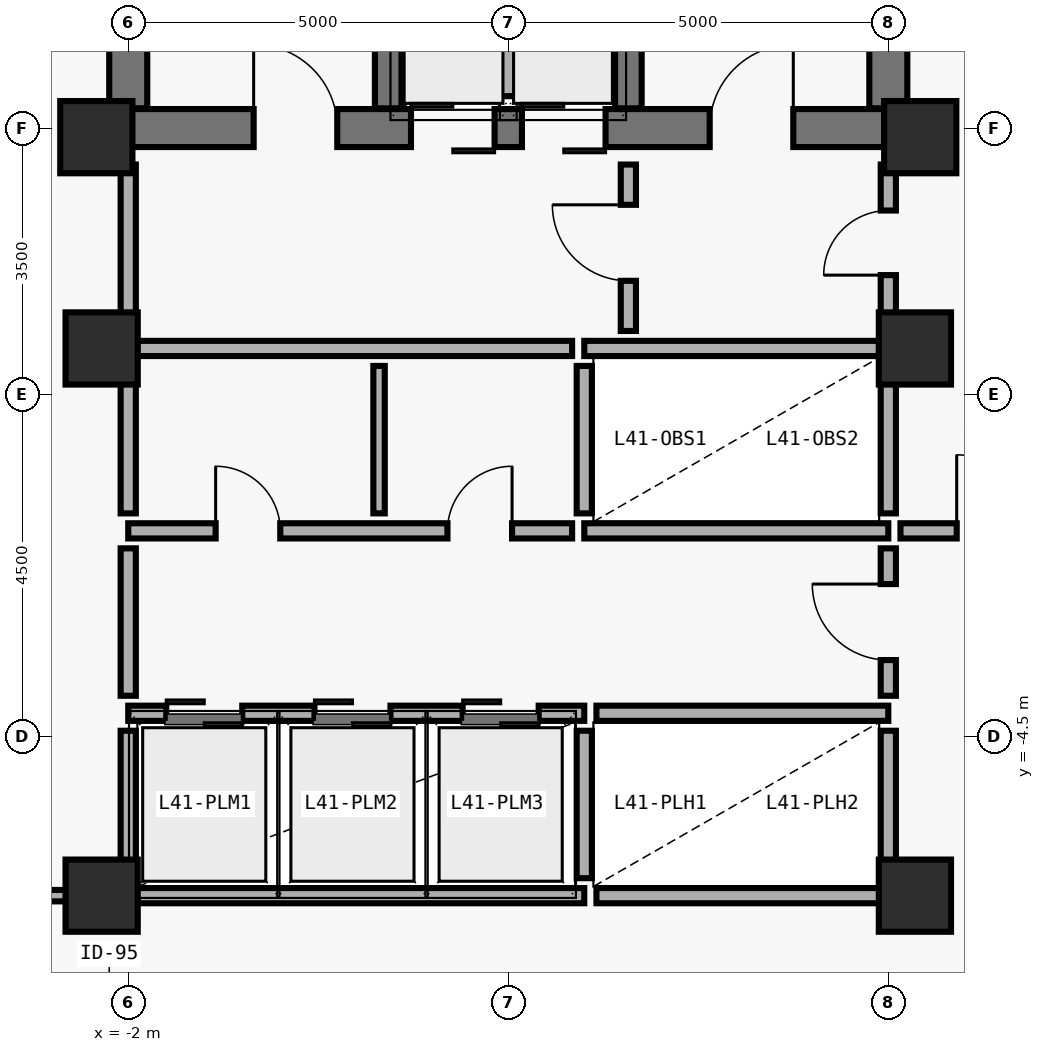
"""IFC4 building model, lengths in metres.
Left out: names, types, materials, properties, quantities, classifications, styles, units other than length and angle.
Written with IfcOpenShell. Run it as: python <this file> out.ifc"""

import sys

from ifc_helpers import new_model, si_unit, direction, frame, frame_2d, origin, origin_2d, place, context, subcontext, project, spatial, rectangle, extrude, element, fill, save


model = new_model("IFC4")
c1 = context("Model", 3, precision=1e-05, world=origin(), true_north=direction((0.0, 1.0)))
c2 = subcontext(c1, "Body", "Model", "MODEL_VIEW")
j1 = project(units=[si_unit("LENGTHUNIT", "METRE"), si_unit("PLANEANGLEUNIT", "RADIAN")], contexts=[c1])
p1 = place(None, origin())
s1 = spatial("IfcSite", under=j1, at=p1, CompositionType="ELEMENT")
p2 = place(p1, origin())
s2 = spatial("IfcBuilding", under=s1, at=p2, CompositionType="ELEMENT")
p3 = place(p2, frame((0.0, 0.0, 165.6)))
s3 = spatial("IfcBuildingStorey", under=s2, at=p3, CompositionType="ELEMENT", Elevation=165.6)
p4 = place(p3, frame((-2.0, 3.5, 0.0), z_axis=(0.0, 0.0, 1.0), x_axis=(1.0, 0.0, 0.0)))
e1 = element("IfcWall", 1, at=p4, inside=s3, PredefinedType="SHEAR", context=c2, shape_type="SweptSolid", body=[
    extrude(rectangle(XDim=10.0, YDim=0.5, at=frame_2d((5.0, 0.0))), origin(), (0.0, 0.0, 1.0), 3.892),
])
p5 = place(p4, frame((1.65, 0.0, 0.0)))
e2 = element("IfcOpeningElement", 2, at=p5, cuts=e1, PredefinedType="OPENING", context=c2, shape_type="SweptSolid", body=[
    extrude(rectangle(XDim=1.1, YDim=2.15, at=frame_2d((0.55, 1.075))), frame((0.0, 0.26, 0.0), z_axis=(0.0, -1.0, 0.0), x_axis=(1.0, 0.0, 0.0)), (0.0, 0.0, 1.0), 0.52),
])
p6 = place(p4, frame((7.65, 0.0, 0.0)))
e3 = element("IfcOpeningElement", 3, at=p6, cuts=e1, PredefinedType="OPENING", context=c2, shape_type="SweptSolid", body=[
    extrude(rectangle(XDim=1.1, YDim=2.15, at=frame_2d((0.55, 1.075))), frame((0.0, 0.26, 0.0), z_axis=(0.0, -1.0, 0.0), x_axis=(1.0, 0.0, 0.0)), (0.0, 0.0, 1.0), 0.52),
])
p7 = place(p4, frame((3.72, 0.0, 0.0)))
e4 = element("IfcOpeningElement", 4, at=p7, cuts=e1, PredefinedType="OPENING", context=c2, shape_type="SweptSolid", body=[
    extrude(rectangle(XDim=1.1, YDim=2.2, at=frame_2d((0.55, 1.1))), frame((0.0, 0.26, 0.0), z_axis=(0.0, -1.0, 0.0), x_axis=(1.0, 0.0, 0.0)), (0.0, 0.0, 1.0), 0.52),
])
p8 = place(p4, frame((5.18, 0.0, 0.0)))
e5 = element("IfcOpeningElement", 5, at=p8, cuts=e1, PredefinedType="OPENING", context=c2, shape_type="SweptSolid", body=[
    extrude(rectangle(XDim=1.1, YDim=2.2, at=frame_2d((0.55, 1.1))), frame((0.0, 0.26, 0.0), z_axis=(0.0, -1.0, 0.0), x_axis=(1.0, 0.0, 0.0)), (0.0, 0.0, 1.0), 0.52),
])
for number, where, z_axis, x_axis in (
    (6, (-2.0, 3.76, 0.0), (0.0, 0.0, 1.0), (0.0, 1.0, 0.0)),
    (7, (8.0, 3.76, 0.0), (0.0, 0.0, 1.0), (0.0, 1.0, 0.0)),
):
    element("IfcWall", number, at=place(p3, frame(where, z_axis=z_axis, x_axis=x_axis)), inside=s3, PredefinedType="SHEAR", context=c2, shape_type="SweptSolid", body=[
        extrude(rectangle(XDim=8.48, YDim=0.5, at=frame_2d((4.24, 0.0))), origin(), (0.0, 0.0, 1.0), 3.892),
    ])
for number, where, z_axis, x_axis in (
    (8, (1.42, 3.76, 0.0), (0.0, 0.0, 1.0), (0.0, 1.0, 0.0)),
    (9, (4.58, 3.76, 0.0), (0.0, 0.0, 1.0), (0.0, 1.0, 0.0)),
):
    element("IfcWall", number, at=place(p3, frame(where, z_axis=z_axis, x_axis=x_axis)), inside=s3, PredefinedType="SHEAR", context=c2, shape_type="SweptSolid", body=[
        extrude(rectangle(XDim=8.48, YDim=0.35, at=frame_2d((4.24, 0.0))), origin(), (0.0, 0.0, 1.0), 3.892),
    ])
for number, where, z_axis, x_axis in (
    (10, (-2.42, 3.38, 0.0), (0.0, 0.0, 1.0), (1.0, 0.0, 0.0)),
    (11, (8.42, 3.38, 0.0), (0.0, 0.0, 1.0), (1.0, 0.0, 0.0)),
    (12, (-2.35, 0.6, 0.0), (0.0, 0.0, 1.0), (1.0, 0.0, 0.0)),
    (13, (8.35, 0.6, 0.0), (0.0, 0.0, 1.0), (1.0, 0.0, 0.0)),
    (14, (-2.35, -6.6, 0.0), (0.0, 0.0, 1.0), (1.0, 0.0, 0.0)),
    (15, (8.35, -6.6, 0.0), (0.0, 0.0, 1.0), (1.0, 0.0, 0.0)),
):
    element("IfcColumn", number, at=place(p3, frame(where, z_axis=z_axis, x_axis=x_axis)), inside=s3, PredefinedType="COLUMN", context=c2, shape_type="SweptSolid", body=[
        extrude(rectangle(XDim=0.95, YDim=0.95, at=origin_2d()), origin(), (0.0, 0.0, 1.0), 3.875),
    ])
p9 = place(p3, frame((3.0, 3.92, 0.0), z_axis=(0.0, 0.0, 1.0), x_axis=(0.0, 1.0, 0.0)))
e16 = element("IfcWall", 16, at=p9, inside=s3, PredefinedType="SOLIDWALL", context=c2, shape_type="SweptSolid", body=[
    extrude(rectangle(XDim=2.03, YDim=0.2, at=frame_2d((1.015, 0.0))), origin(), (0.0, 0.0, 1.0), 3.45),
])
p10 = place(p3, frame((4.0, 0.6, 0.0), z_axis=(0.0, 0.0, 1.0), x_axis=(1.0, 0.0, 0.0)))
e17 = element("IfcWall", 17, at=p10, inside=s3, PredefinedType="SOLIDWALL", context=c2, shape_type="SweptSolid", body=[
    extrude(rectangle(XDim=3.88, YDim=0.2, at=frame_2d((1.94, 0.0))), origin(), (0.0, 0.0, 1.0), 3.032),
])
p11 = place(p3, frame((4.0, -1.8, 0.0), z_axis=(0.0, 0.0, 1.0), x_axis=(1.0, 0.0, 0.0)))
e18 = element("IfcWall", 18, at=p11, inside=s3, PredefinedType="SOLIDWALL", context=c2, shape_type="SweptSolid", body=[
    extrude(rectangle(XDim=4.0, YDim=0.2, at=frame_2d((2.0, 0.0))), origin(), (0.0, 0.0, 1.0), 3.45),
])
p12 = place(p3, frame((4.0, -1.57, 0.0), z_axis=(0.0, 0.0, 1.0), x_axis=(0.0, 1.0, 0.0)))
e19 = element("IfcWall", 19, at=p12, inside=s3, PredefinedType="SOLIDWALL", context=c2, shape_type="SweptSolid", body=[
    extrude(rectangle(XDim=1.94, YDim=0.2, at=frame_2d((0.97, 0.0))), origin(), (0.0, 0.0, 1.0), 3.45),
])
p13 = place(p3, frame((8.0, -1.57, 0.0), z_axis=(0.0, 0.0, 1.0), x_axis=(0.0, 1.0, 0.0)))
e20 = element("IfcWall", 20, at=p13, inside=s3, PredefinedType="SOLIDWALL", context=c2, shape_type="SweptSolid", body=[
    extrude(rectangle(XDim=2.05, YDim=0.2, at=frame_2d((1.025, 0.0))), origin(), (0.0, 0.0, 1.0), 3.032),
])
p14 = place(p3, frame((-2.0, -4.2, 0.0), z_axis=(0.0, 0.0, 1.0), x_axis=(1.0, 0.0, 0.0)))
e21 = element("IfcWall", 21, at=p14, inside=s3, PredefinedType="SOLIDWALL", context=c2, shape_type="SweptSolid", body=[
    extrude(rectangle(XDim=6.0, YDim=0.2, at=frame_2d((3.0, 0.0))), origin(), (0.0, 0.0, 1.0), 3.45),
])
p15 = place(p14, frame((0.5, 0.0, 0.0)))
e22 = element("IfcOpeningElement", 22, at=p15, cuts=e21, PredefinedType="OPENING", context=c2, shape_type="SweptSolid", body=[
    extrude(rectangle(XDim=1.0, YDim=2.2, at=frame_2d((0.5, 1.1))), frame((0.0, 0.11, 0.0), z_axis=(0.0, -1.0, 0.0), x_axis=(1.0, 0.0, 0.0)), (0.0, 0.0, 1.0), 0.22),
])
p16 = place(p14, frame((2.45, 0.0, 0.0)))
e23 = element("IfcOpeningElement", 23, at=p16, cuts=e21, PredefinedType="OPENING", context=c2, shape_type="SweptSolid", body=[
    extrude(rectangle(XDim=1.0, YDim=2.2, at=frame_2d((0.5, 1.1))), frame((0.0, 0.11, 0.0), z_axis=(0.0, -1.0, 0.0), x_axis=(1.0, 0.0, 0.0)), (0.0, 0.0, 1.0), 0.22),
])
p17 = place(p14, frame((4.4, 0.0, 0.0)))
e24 = element("IfcOpeningElement", 24, at=p17, cuts=e21, PredefinedType="OPENING", context=c2, shape_type="SweptSolid", body=[
    extrude(rectangle(XDim=1.0, YDim=2.2, at=frame_2d((0.5, 1.1))), frame((0.0, 0.11, 0.0), z_axis=(0.0, -1.0, 0.0), x_axis=(1.0, 0.0, 0.0)), (0.0, 0.0, 1.0), 0.22),
])
p18 = place(p3, frame((-2.0, -6.6, 0.0), z_axis=(0.0, 0.0, 1.0), x_axis=(1.0, 0.0, 0.0)))
e25 = element("IfcWall", 25, at=p18, inside=s3, PredefinedType="SOLIDWALL", context=c2, shape_type="SweptSolid", body=[
    extrude(rectangle(XDim=6.0, YDim=0.2, at=frame_2d((3.0, 0.0))), origin(), (0.0, 0.0, 1.0), 3.032),
])
p19 = place(p3, frame((-2.0, -6.37, 0.0), z_axis=(0.0, 0.0, 1.0), x_axis=(0.0, 1.0, 0.0)))
e26 = element("IfcWall", 26, at=p19, inside=s3, PredefinedType="SOLIDWALL", context=c2, shape_type="SweptSolid", body=[
    extrude(rectangle(XDim=1.94, YDim=0.2, at=frame_2d((0.97, 0.0))), origin(), (0.0, 0.0, 1.0), 3.032),
])
p20 = place(p3, frame((4.16, -4.2, 0.0), z_axis=(0.0, 0.0, 1.0), x_axis=(1.0, 0.0, 0.0)))
e27 = element("IfcWall", 27, at=p20, inside=s3, PredefinedType="SOLIDWALL", context=c2, shape_type="SweptSolid", body=[
    extrude(rectangle(XDim=3.84, YDim=0.2, at=frame_2d((1.92, 0.0))), origin(), (0.0, 0.0, 1.0), 3.45),
])
p21 = place(p3, frame((4.16, -6.6, 0.0), z_axis=(0.0, 0.0, 1.0), x_axis=(1.0, 0.0, 0.0)))
e28 = element("IfcWall", 28, at=p21, inside=s3, PredefinedType="SOLIDWALL", context=c2, shape_type="SweptSolid", body=[
    extrude(rectangle(XDim=3.84, YDim=0.2, at=frame_2d((1.92, 0.0))), origin(), (0.0, 0.0, 1.0), 3.032),
])
p22 = place(p3, frame((4.0, -6.37, 0.0), z_axis=(0.0, 0.0, 1.0), x_axis=(0.0, 1.0, 0.0)))
e29 = element("IfcWall", 29, at=p22, inside=s3, PredefinedType="SOLIDWALL", context=c2, shape_type="SweptSolid", body=[
    extrude(rectangle(XDim=1.94, YDim=0.2, at=frame_2d((0.97, 0.0))), origin(), (0.0, 0.0, 1.0), 3.45),
])
p23 = place(p3, frame((8.0, -6.37, 0.0), z_axis=(0.0, 0.0, 1.0), x_axis=(0.0, 1.0, 0.0)))
e30 = element("IfcWall", 30, at=p23, inside=s3, PredefinedType="SOLIDWALL", context=c2, shape_type="SweptSolid", body=[
    extrude(rectangle(XDim=1.94, YDim=0.2, at=frame_2d((0.97, 0.0))), origin(), (0.0, 0.0, 1.0), 3.032),
])
p24 = place(p3, frame((4.58, 0.83, 0.0), z_axis=(0.0, 0.0, 1.0), x_axis=(0.0, 1.0, 0.0)))
e31 = element("IfcWall", 31, at=p24, inside=s3, PredefinedType="MOVABLE", context=c2, shape_type="SweptSolid", body=[
    extrude(rectangle(XDim=2.19, YDim=0.2, at=frame_2d((1.095, 0.0))), origin(), (0.0, 0.0, 1.0), 3.45),
])
p25 = place(p24, frame((0.66, 0.0, 0.0)))
e32 = element("IfcOpeningElement", 32, at=p25, cuts=e31, PredefinedType="OPENING", context=c2, shape_type="SweptSolid", body=[
    extrude(rectangle(XDim=1.0, YDim=2.1, at=frame_2d((0.5, 1.05))), frame((0.0, 0.11, 0.0), z_axis=(0.0, -1.0, 0.0), x_axis=(1.0, 0.0, 0.0)), (0.0, 0.0, 1.0), 0.22),
])
p26 = place(p3, frame((8.0, 0.72, 0.0), z_axis=(0.0, 0.0, 1.0), x_axis=(0.0, 1.0, 0.0)))
e33 = element("IfcWall", 33, at=p26, inside=s3, PredefinedType="MOVABLE", context=c2, shape_type="SweptSolid", body=[
    extrude(rectangle(XDim=2.3, YDim=0.2, at=frame_2d((1.15, 0.0))), origin(), (0.0, 0.0, 1.0), 2.782),
])
p27 = place(p26, frame((0.845, 0.0, 0.0)))
e34 = element("IfcOpeningElement", 34, at=p27, cuts=e33, PredefinedType="OPENING", context=c2, shape_type="SweptSolid", body=[
    extrude(rectangle(XDim=0.85, YDim=2.1, at=frame_2d((0.425, 1.05))), frame((0.0, 0.11, 0.0), z_axis=(0.0, -1.0, 0.0), x_axis=(1.0, 0.0, 0.0)), (0.0, 0.0, 1.0), 0.22),
])
p28 = place(p3, frame((8.0, -3.97, 0.0), z_axis=(0.0, 0.0, 1.0), x_axis=(0.0, 1.0, 0.0)))
e35 = element("IfcWall", 35, at=p28, inside=s3, PredefinedType="MOVABLE", context=c2, shape_type="SweptSolid", body=[
    extrude(rectangle(XDim=1.94, YDim=0.2, at=frame_2d((0.97, 0.0))), origin(), (0.0, 0.0, 1.0), 3.032),
])
p29 = place(p28, frame((0.47, 0.0, 0.0)))
e36 = element("IfcOpeningElement", 36, at=p29, cuts=e35, PredefinedType="OPENING", context=c2, shape_type="SweptSolid", body=[
    extrude(rectangle(XDim=1.0, YDim=2.1, at=frame_2d((0.5, 1.05))), frame((0.0, 0.11, 0.0), z_axis=(0.0, -1.0, 0.0), x_axis=(1.0, 0.0, 0.0)), (0.0, 0.0, 1.0), 0.22),
])
p30 = place(p3, frame((-2.0, -1.8, 0.0), z_axis=(0.0, 0.0, 1.0), x_axis=(1.0, 0.0, 0.0)))
e37 = element("IfcWall", 37, at=p30, inside=s3, PredefinedType="MOVABLE", context=c2, shape_type="SweptSolid", body=[
    extrude(rectangle(XDim=5.84, YDim=0.2, at=frame_2d((2.92, 0.0))), origin(), (0.0, 0.0, 1.0), 3.45),
])
p31 = place(p30, frame((1.15, 0.0, 0.0)))
e38 = element("IfcOpeningElement", 38, at=p31, cuts=e37, PredefinedType="OPENING", context=c2, shape_type="SweptSolid", body=[
    extrude(rectangle(XDim=0.85, YDim=2.1, at=frame_2d((0.425, 1.05))), frame((0.0, 0.11, 0.0), z_axis=(0.0, -1.0, 0.0), x_axis=(1.0, 0.0, 0.0)), (0.0, 0.0, 1.0), 0.22),
])
p32 = place(p30, frame((4.2, 0.0, 0.0)))
e39 = element("IfcOpeningElement", 39, at=p32, cuts=e37, PredefinedType="OPENING", context=c2, shape_type="SweptSolid", body=[
    extrude(rectangle(XDim=0.85, YDim=2.1, at=frame_2d((0.425, 1.05))), frame((0.0, 0.11, 0.0), z_axis=(0.0, -1.0, 0.0), x_axis=(1.0, 0.0, 0.0)), (0.0, 0.0, 1.0), 0.22),
])
p33 = place(p3, frame((8.16, -1.8, 0.0), z_axis=(0.0, 0.0, 1.0), x_axis=(1.0, 0.0, 0.0)))
e40 = element("IfcWall", 40, at=p33, inside=s3, PredefinedType="MOVABLE", context=c2, shape_type="SweptSolid", body=[
    extrude(rectangle(XDim=2.64, YDim=0.2, at=frame_2d((1.32, 0.0))), origin(), (0.0, 0.0, 1.0), 3.45),
])
p34 = place(p33, frame((0.74, 0.0, 0.0)))
e41 = element("IfcOpeningElement", 41, at=p34, cuts=e40, PredefinedType="OPENING", context=c2, shape_type="SweptSolid", body=[
    extrude(rectangle(XDim=1.0, YDim=2.1, at=frame_2d((0.5, 1.05))), frame((0.0, 0.11, 0.0), z_axis=(0.0, -1.0, 0.0), x_axis=(1.0, 0.0, 0.0)), (0.0, 0.0, 1.0), 0.22),
])
p35 = place(p3, frame((-2.16, -6.6, 0.0), z_axis=(0.0, 0.0, 1.0), x_axis=(-1.0, 0.0, 0.0)))
e42 = element("IfcWall", 42, at=p35, inside=s3, PredefinedType="PARTITIONING", context=c2, shape_type="SweptSolid", body=[
    extrude(rectangle(XDim=10.34, YDim=0.15, at=frame_2d((5.17, 0.0))), origin(), (0.0, 0.0, 1.0), 2.882),
])
p36 = place(p35, frame((4.615, 0.0, 0.0)))
e43 = element("IfcOpeningElement", 43, at=p36, cuts=e42, PredefinedType="OPENING", context=c2, shape_type="SweptSolid", body=[
    extrude(rectangle(XDim=0.95, YDim=2.1, at=frame_2d((0.475, 1.05))), frame((0.0, 0.085, 0.0), z_axis=(0.0, -1.0, 0.0), x_axis=(1.0, 0.0, 0.0)), (0.0, 0.0, 1.0), 0.17),
])
p37 = place(p3, frame((-1.88, 0.6, 0.0), z_axis=(0.0, 0.0, 1.0), x_axis=(1.0, 0.0, 0.0)))
e44 = element("IfcWall", 44, at=p37, inside=s3, PredefinedType="MOVABLE", context=c2, shape_type="SweptSolid", body=[
    extrude(rectangle(XDim=5.72, YDim=0.2, at=frame_2d((2.86, 0.0))), origin(), (0.0, 0.0, 1.0), 3.032),
])
p38 = place(p3, frame((-2.0, 0.72, 0.0), z_axis=(0.0, 0.0, 1.0), x_axis=(0.0, 1.0, 0.0)))
e45 = element("IfcWall", 45, at=p38, inside=s3, PredefinedType="MOVABLE", context=c2, shape_type="SweptSolid", body=[
    extrude(rectangle(XDim=2.3, YDim=0.2, at=frame_2d((1.15, 0.0))), origin(), (0.0, 0.0, 1.0), 2.782),
])
p39 = place(p3, frame((-2.0, -3.97, 0.0), z_axis=(0.0, 0.0, 1.0), x_axis=(0.0, 1.0, 0.0)))
e46 = element("IfcWall", 46, at=p39, inside=s3, PredefinedType="MOVABLE", context=c2, shape_type="SweptSolid", body=[
    extrude(rectangle(XDim=1.94, YDim=0.2, at=frame_2d((0.97, 0.0))), origin(), (0.0, 0.0, 1.0), 3.032),
])
p40 = place(p3, frame((1.3, -1.57, 0.0), z_axis=(0.0, 0.0, 1.0), x_axis=(0.0, 1.0, 0.0)))
e47 = element("IfcWall", 47, at=p40, inside=s3, PredefinedType="PARTITIONING", context=c2, shape_type="SweptSolid", body=[
    extrude(rectangle(XDim=1.94, YDim=0.15, at=frame_2d((0.97, 0.0))), origin(), (0.0, 0.0, 1.0), 3.45),
])
p41 = place(p3, frame((-2.0, -1.57, 0.0), z_axis=(0.0, 0.0, 1.0), x_axis=(0.0, 1.0, 0.0)))
e48 = element("IfcWall", 48, at=p41, inside=s3, PredefinedType="MOVABLE", context=c2, shape_type="SweptSolid", body=[
    extrude(rectangle(XDim=2.05, YDim=0.2, at=frame_2d((1.025, 0.0))), origin(), (0.0, 0.0, 1.0), 3.032),
])
p42 = place(p5, origin())
e49 = element("IfcDoor", 49, at=p42, inside=s3, OperationType="SINGLE_SWING_LEFT", PredefinedType="DOOR", context=c2, shape_type="SweptSolid", body=[
    extrude(rectangle(XDim=1.1, YDim=2.15, at=frame_2d((0.55, 1.075))), frame((0.0, 0.025, 0.0), z_axis=(0.0, -1.0, 0.0), x_axis=(1.0, 0.0, 0.0)), (0.0, 0.0, 1.0), 0.05),
])
fill(e2, e49)
p43 = place(p6, origin())
e50 = element("IfcDoor", 50, at=p43, inside=s3, OperationType="SINGLE_SWING_RIGHT", PredefinedType="DOOR", context=c2, shape_type="SweptSolid", body=[
    extrude(rectangle(XDim=1.1, YDim=2.15, at=frame_2d((0.55, 1.075))), frame((0.0, 0.025, 0.0), z_axis=(0.0, -1.0, 0.0), x_axis=(1.0, 0.0, 0.0)), (0.0, 0.0, 1.0), 0.05),
])
fill(e3, e50)
p44 = place(p7, origin())
e51 = element("IfcDoor", 51, at=p44, inside=s3, OperationType="DOUBLE_DOOR_SLIDING", PredefinedType="DOOR", context=c2, shape_type="SweptSolid", body=[
    extrude(rectangle(XDim=1.1, YDim=2.2, at=frame_2d((0.55, 1.1))), frame((0.0, 0.025, 0.0), z_axis=(0.0, -1.0, 0.0), x_axis=(1.0, 0.0, 0.0)), (0.0, 0.0, 1.0), 0.05),
])
fill(e4, e51)
p45 = place(p8, origin())
e52 = element("IfcDoor", 52, at=p45, inside=s3, OperationType="DOUBLE_DOOR_SLIDING", PredefinedType="DOOR", context=c2, shape_type="SweptSolid", body=[
    extrude(rectangle(XDim=1.1, YDim=2.2, at=frame_2d((0.55, 1.1))), frame((0.0, 0.025, 0.0), z_axis=(0.0, -1.0, 0.0), x_axis=(1.0, 0.0, 0.0)), (0.0, 0.0, 1.0), 0.05),
])
fill(e5, e52)
p46 = place(p25, origin())
e53 = element("IfcDoor", 53, at=p46, inside=s3, OperationType="SINGLE_SWING_RIGHT", PredefinedType="DOOR", context=c2, shape_type="SweptSolid", body=[
    extrude(rectangle(XDim=1.0, YDim=2.1, at=frame_2d((0.5, 1.05))), frame((0.0, 0.025, 0.0), z_axis=(0.0, -1.0, 0.0), x_axis=(1.0, 0.0, 0.0)), (0.0, 0.0, 1.0), 0.05),
])
fill(e32, e53)
p47 = place(p27, origin())
e54 = element("IfcDoor", 54, at=p47, inside=s3, OperationType="SINGLE_SWING_LEFT", PredefinedType="DOOR", context=c2, shape_type="SweptSolid", body=[
    extrude(rectangle(XDim=0.85, YDim=2.1, at=frame_2d((0.425, 1.05))), frame((0.0, 0.025, 0.0), z_axis=(0.0, -1.0, 0.0), x_axis=(1.0, 0.0, 0.0)), (0.0, 0.0, 1.0), 0.05),
])
fill(e34, e54)
p48 = place(p29, origin())
e55 = element("IfcDoor", 55, at=p48, inside=s3, OperationType="SINGLE_SWING_RIGHT", PredefinedType="DOOR", context=c2, shape_type="SweptSolid", body=[
    extrude(rectangle(XDim=1.0, YDim=2.1, at=frame_2d((0.5, 1.05))), frame((0.0, 0.025, 0.0), z_axis=(0.0, -1.0, 0.0), x_axis=(1.0, 0.0, 0.0)), (0.0, 0.0, 1.0), 0.05),
])
fill(e36, e55)
p49 = place(p31, origin())
e56 = element("IfcDoor", 56, at=p49, inside=s3, OperationType="SINGLE_SWING_LEFT", PredefinedType="DOOR", context=c2, shape_type="SweptSolid", body=[
    extrude(rectangle(XDim=0.85, YDim=2.1, at=frame_2d((0.425, 1.05))), frame((0.0, 0.025, 0.0), z_axis=(0.0, -1.0, 0.0), x_axis=(1.0, 0.0, 0.0)), (0.0, 0.0, 1.0), 0.05),
])
fill(e38, e56)
p50 = place(p32, origin())
e57 = element("IfcDoor", 57, at=p50, inside=s3, OperationType="SINGLE_SWING_RIGHT", PredefinedType="DOOR", context=c2, shape_type="SweptSolid", body=[
    extrude(rectangle(XDim=0.85, YDim=2.1, at=frame_2d((0.425, 1.05))), frame((0.0, 0.025, 0.0), z_axis=(0.0, -1.0, 0.0), x_axis=(1.0, 0.0, 0.0)), (0.0, 0.0, 1.0), 0.05),
])
fill(e39, e57)
p51 = place(p34, origin())
e58 = element("IfcDoor", 58, at=p51, inside=s3, OperationType="SINGLE_SWING_LEFT", PredefinedType="DOOR", context=c2, shape_type="SweptSolid", body=[
    extrude(rectangle(XDim=1.0, YDim=2.1, at=frame_2d((0.5, 1.05))), frame((0.0, 0.025, 0.0), z_axis=(0.0, -1.0, 0.0), x_axis=(1.0, 0.0, 0.0)), (0.0, 0.0, 1.0), 0.05),
])
fill(e41, e58)
p52 = place(p15, origin())
e59 = element("IfcDoor", 59, at=p52, inside=s3, OperationType="DOUBLE_DOOR_SLIDING", PredefinedType="DOOR", context=c2, shape_type="SweptSolid", body=[
    extrude(rectangle(XDim=1.0, YDim=2.2, at=frame_2d((0.5, 1.1))), frame((0.0, 0.025, 0.0), z_axis=(0.0, -1.0, 0.0), x_axis=(1.0, 0.0, 0.0)), (0.0, 0.0, 1.0), 0.05),
])
fill(e22, e59)
p53 = place(p16, origin())
e60 = element("IfcDoor", 60, at=p53, inside=s3, OperationType="DOUBLE_DOOR_SLIDING", PredefinedType="DOOR", context=c2, shape_type="SweptSolid", body=[
    extrude(rectangle(XDim=1.0, YDim=2.2, at=frame_2d((0.5, 1.1))), frame((0.0, 0.025, 0.0), z_axis=(0.0, -1.0, 0.0), x_axis=(1.0, 0.0, 0.0)), (0.0, 0.0, 1.0), 0.05),
])
fill(e23, e60)
p54 = place(p17, origin())
e61 = element("IfcDoor", 61, at=p54, inside=s3, OperationType="DOUBLE_DOOR_SLIDING", PredefinedType="DOOR", context=c2, shape_type="SweptSolid", body=[
    extrude(rectangle(XDim=1.0, YDim=2.2, at=frame_2d((0.5, 1.1))), frame((0.0, 0.025, 0.0), z_axis=(0.0, -1.0, 0.0), x_axis=(1.0, 0.0, 0.0)), (0.0, 0.0, 1.0), 0.05),
])
fill(e24, e61)
save(model, sys.argv[1])
